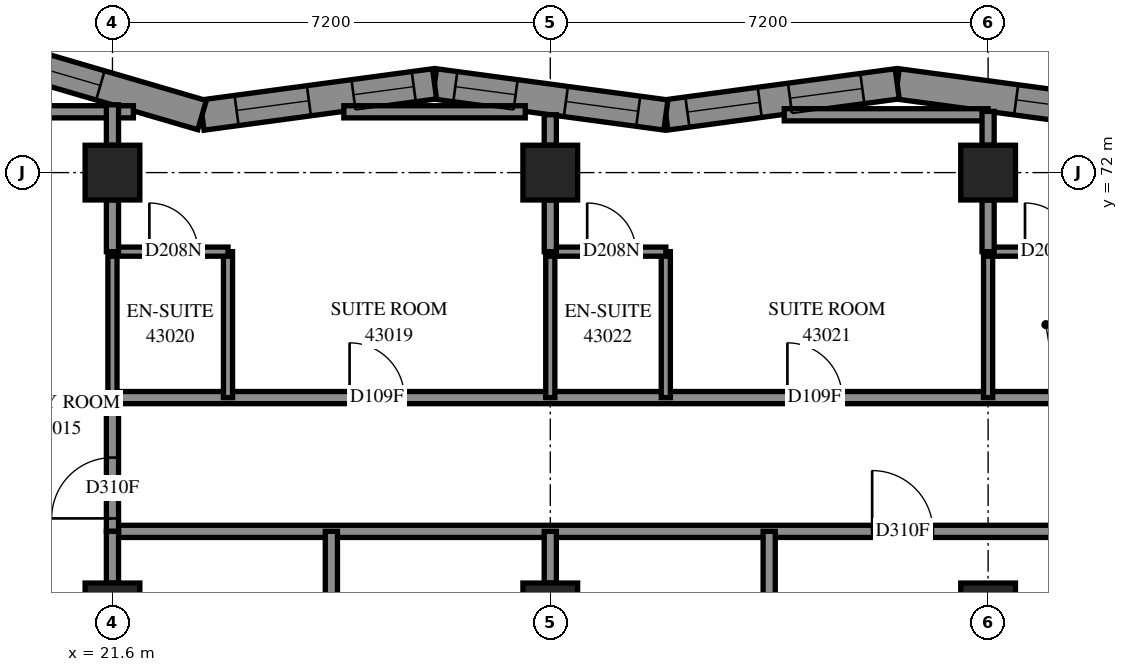
"""IFC4 building model, lengths in metres.
Left out: names, types, materials, properties, quantities, classifications, styles, units other than length and angle.
Written with IfcOpenShell. Run it as: python <this file> out.ifc"""

import sys

from ifc_helpers import new_model, si_unit, direction, frame, frame_2d, origin, origin_2d, place, context, subcontext, project, spatial, polyline, rectangle, outline, extrude, element, fill, save


model = new_model("IFC4")
c1 = context("Model", 3, precision=1e-05, world=origin(), true_north=direction((0.0, 1.0)))
c2 = subcontext(c1, "Body", "Model", "MODEL_VIEW")
j1 = project(units=[si_unit("LENGTHUNIT", "METRE"), si_unit("PLANEANGLEUNIT", "RADIAN")], contexts=[c1])
p1 = place(None, origin())
s1 = spatial("IfcSite", under=j1, at=p1, CompositionType="ELEMENT")
p2 = place(p1, origin())
s2 = spatial("IfcBuilding", under=s1, at=p2, CompositionType="ELEMENT")
p3 = place(p2, frame((0.0, 0.0, 159.2)))
s3 = spatial("IfcBuildingStorey", under=s2, at=p3, CompositionType="ELEMENT", Elevation=159.2)
for number, where, z_axis, x_axis in (
    (1, (21.6, 64.8, 0.0), (0.0, 0.0, 1.0), (1.0, 0.0, 0.0)),
    (2, (21.6, 72.0, 0.0), (0.0, 0.0, 1.0), (1.0, 0.0, 0.0)),
    (3, (28.8, 64.8, 0.0), (0.0, 0.0, 1.0), (1.0, 0.0, 0.0)),
    (4, (28.8, 72.0, 0.0), (0.0, 0.0, 1.0), (1.0, 0.0, 0.0)),
    (5, (36.0, 64.8, 0.0), (0.0, 0.0, 1.0), (1.0, 0.0, 0.0)),
    (6, (36.0, 72.0, 0.0), (0.0, 0.0, 1.0), (1.0, 0.0, 0.0)),
):
    element("IfcColumn", number, at=place(p3, frame(where, z_axis=z_axis, x_axis=x_axis)), inside=s3, PredefinedType="COLUMN", context=c2, shape_type="SweptSolid", body=[
        extrude(rectangle(XDim=0.9, YDim=0.9, at=origin_2d()), origin(), (0.0, 0.0, 1.0), 3.1),
    ])
p4 = place(p3, frame((38.31, 72.948, 0.0), z_axis=(0.0, 0.0, 1.0), x_axis=(-0.9910651652, 0.1333785524, 0.0)))
e7 = element("IfcWall", 7, at=p4, inside=s3, PredefinedType="SOLIDWALL", context=c2, shape_type="SweptSolid", body=[
    extrude(outline(polyline([(0.034, -0.25), (3.872, -0.25), (3.805, 0.25), (-0.034, 0.25), (0.034, -0.25)])), origin(), (0.0, 0.0, 1.0), 3.1),
])
p5 = place(p4, frame((0.665, 0.0, 0.45)))
e8 = element("IfcOpeningElement", 8, at=p5, cuts=e7, PredefinedType="OPENING", context=c2, shape_type="SweptSolid", body=[
    extrude(rectangle(XDim=1.2, YDim=2.5, at=frame_2d((0.6, 1.25))), frame((0.0, 0.26, 0.0), z_axis=(0.0, -1.0, 0.0), x_axis=(1.0, 0.0, 0.0)), (0.0, 0.0, 1.0), 0.52),
])
p6 = place(p3, frame((34.505, 73.46, 0.0), z_axis=(0.0, 0.0, 1.0), x_axis=(-0.9910647018, -0.133381996, 0.0)))
e9 = element("IfcWall", 9, at=p6, inside=s3, PredefinedType="SOLIDWALL", context=c2, shape_type="SweptSolid", body=[
    extrude(outline(polyline([(-0.034, -0.25), (3.805, -0.25), (3.872, 0.25), (0.034, 0.25), (-0.034, -0.25)])), origin(), (0.0, 0.0, 1.0), 3.1),
])
p7 = place(p6, frame((0.579, 0.0, 0.45)))
e10 = element("IfcOpeningElement", 10, at=p7, cuts=e9, PredefinedType="OPENING", context=c2, shape_type="SweptSolid", body=[
    extrude(rectangle(XDim=1.2, YDim=2.5, at=frame_2d((0.6, 1.25))), frame((0.0, 0.26, 0.0), z_axis=(0.0, -1.0, 0.0), x_axis=(1.0, 0.0, 0.0)), (0.0, 0.0, 1.0), 0.52),
])
p8 = place(p6, frame((2.281, 0.0, 0.45)))
e11 = element("IfcOpeningElement", 11, at=p8, cuts=e9, PredefinedType="OPENING", context=c2, shape_type="SweptSolid", body=[
    extrude(rectangle(XDim=1.2, YDim=2.5, at=frame_2d((0.6, 1.25))), frame((0.0, 0.26, 0.0), z_axis=(0.0, -1.0, 0.0), x_axis=(1.0, 0.0, 0.0)), (0.0, 0.0, 1.0), 0.52),
])
p9 = place(p3, frame((30.701, 72.948, 0.0), z_axis=(0.0, 0.0, 1.0), x_axis=(-0.9910651652, 0.1333785524, 0.0)))
e12 = element("IfcWall", 12, at=p9, inside=s3, PredefinedType="SOLIDWALL", context=c2, shape_type="SweptSolid", body=[
    extrude(outline(polyline([(0.034, -0.25), (3.872, -0.25), (3.805, 0.25), (-0.034, 0.25), (0.034, -0.25)])), origin(), (0.0, 0.0, 1.0), 3.1),
])
p10 = place(p9, frame((0.459, 0.0, 0.45)))
e13 = element("IfcOpeningElement", 13, at=p10, cuts=e12, PredefinedType="OPENING", context=c2, shape_type="SweptSolid", body=[
    extrude(rectangle(XDim=1.2, YDim=2.5, at=frame_2d((0.6, 1.25))), frame((0.0, 0.26, 0.0), z_axis=(0.0, -1.0, 0.0), x_axis=(1.0, 0.0, 0.0)), (0.0, 0.0, 1.0), 0.52),
])
p11 = place(p9, frame((2.494, 0.0, 0.45)))
e14 = element("IfcOpeningElement", 14, at=p11, cuts=e12, PredefinedType="OPENING", context=c2, shape_type="SweptSolid", body=[
    extrude(rectangle(XDim=1.0, YDim=2.5, at=frame_2d((0.5, 1.25))), frame((0.0, 0.26, 0.0), z_axis=(0.0, -1.0, 0.0), x_axis=(1.0, 0.0, 0.0)), (0.0, 0.0, 1.0), 0.52),
])
p12 = place(p3, frame((26.897, 73.46, 0.0), z_axis=(0.0, 0.0, 1.0), x_axis=(-0.9910680415, -0.1333571784, 0.0)))
e15 = element("IfcWall", 15, at=p12, inside=s3, PredefinedType="SOLIDWALL", context=c2, shape_type="SweptSolid", body=[
    extrude(outline(polyline([(-0.034, -0.25), (3.805, -0.25), (3.911, 0.25), (0.034, 0.25), (-0.034, -0.25)])), origin(), (0.0, 0.0, 1.0), 3.1),
])
p13 = place(p12, frame((2.085, 0.0, 0.45)))
e16 = element("IfcOpeningElement", 16, at=p13, cuts=e15, PredefinedType="OPENING", context=c2, shape_type="SweptSolid", body=[
    extrude(rectangle(XDim=1.2, YDim=2.5, at=frame_2d((0.6, 1.25))), frame((0.0, 0.26, 0.0), z_axis=(0.0, -1.0, 0.0), x_axis=(1.0, 0.0, 0.0)), (0.0, 0.0, 1.0), 0.52),
])
p14 = place(p12, frame((0.345, 0.0, 0.45)))
e17 = element("IfcOpeningElement", 17, at=p14, cuts=e15, PredefinedType="OPENING", context=c2, shape_type="SweptSolid", body=[
    extrude(rectangle(XDim=1.0, YDim=2.5, at=frame_2d((0.5, 1.25))), frame((0.0, 0.26, 0.0), z_axis=(0.0, -1.0, 0.0), x_axis=(1.0, 0.0, 0.0)), (0.0, 0.0, 1.0), 0.52),
])
p15 = place(p3, frame((23.073, 72.945, 0.0), z_axis=(0.0, 0.0, 1.0), x_axis=(-0.9598371454, 0.2805577557, 0.0)))
e18 = element("IfcWall", 18, at=p15, inside=s3, PredefinedType="SOLIDWALL", context=c2, shape_type="SweptSolid", body=[
    extrude(outline(polyline([(0.053, -0.25), (4.017, -0.25), (3.349, 0.25), (-0.053, 0.25), (0.053, -0.25)])), origin(), (0.0, 0.0, 1.0), 3.1),
])
p16 = place(p15, frame((1.742, 0.0, 0.45)))
e19 = element("IfcOpeningElement", 19, at=p16, cuts=e18, PredefinedType="OPENING", context=c2, shape_type="SweptSolid", body=[
    extrude(rectangle(XDim=1.2, YDim=2.5, at=frame_2d((0.6, 1.25))), frame((0.0, 0.26, 0.0), z_axis=(0.0, -1.0, 0.0), x_axis=(1.0, 0.0, 0.0)), (0.0, 0.0, 1.0), 0.52),
])
p17 = place(p3, frame((21.6, 68.3, 0.0), z_axis=(0.0, 0.0, 1.0), x_axis=(1.0, 0.0, 0.0)))
e20 = element("IfcWall", 20, at=p17, inside=s3, PredefinedType="PARTITIONING", context=c2, shape_type="SweptSolid", body=[
    extrude(rectangle(XDim=19.1, YDim=0.2, at=frame_2d((9.55, 0.0))), origin(), (0.0, 0.0, 1.0), 3.1),
])
p18 = place(p17, frame((3.899, 0.0, 0.0)))
e21 = element("IfcOpeningElement", 21, at=p18, cuts=e20, PredefinedType="OPENING", context=c2, shape_type="SweptSolid", body=[
    extrude(rectangle(XDim=0.9, YDim=2.1, at=frame_2d((0.45, 1.05))), frame((0.0, 0.11, 0.0), z_axis=(0.0, -1.0, 0.0), x_axis=(1.0, 0.0, 0.0)), (0.0, 0.0, 1.0), 0.22),
])
p19 = place(p17, frame((11.099, 0.0, 0.0)))
e22 = element("IfcOpeningElement", 22, at=p19, cuts=e20, PredefinedType="OPENING", context=c2, shape_type="SweptSolid", body=[
    extrude(rectangle(XDim=0.9, YDim=2.1, at=frame_2d((0.45, 1.05))), frame((0.0, 0.11, 0.0), z_axis=(0.0, -1.0, 0.0), x_axis=(1.0, 0.0, 0.0)), (0.0, 0.0, 1.0), 0.22),
])
p20 = place(p17, frame((16.7, 0.0, 0.0)))
e23 = element("IfcOpeningElement", 23, at=p20, cuts=e20, PredefinedType="OPENING", context=c2, shape_type="SweptSolid", body=[
    extrude(rectangle(XDim=0.9, YDim=2.1, at=frame_2d((0.45, 1.05))), frame((0.0, 0.11, 0.0), z_axis=(0.0, -1.0, 0.0), x_axis=(1.0, 0.0, 0.0)), (0.0, 0.0, 1.0), 0.22),
])
p21 = place(p3, frame((21.6, 66.1, 0.0), z_axis=(0.0, 0.0, 1.0), x_axis=(1.0, 0.0, 0.0)))
e24 = element("IfcWall", 24, at=p21, inside=s3, PredefinedType="PARTITIONING", context=c2, shape_type="SweptSolid", body=[
    extrude(rectangle(XDim=16.9, YDim=0.2, at=frame_2d((8.45, 0.0))), origin(), (0.0, 0.0, 1.0), 3.1),
])
p22 = place(p21, frame((12.493, 0.0, 0.0)))
e25 = element("IfcOpeningElement", 25, at=p22, cuts=e24, PredefinedType="OPENING", context=c2, shape_type="SweptSolid", body=[
    extrude(rectangle(XDim=1.0, YDim=2.1, at=frame_2d((0.5, 1.05))), frame((0.0, 0.11, 0.0), z_axis=(0.0, -1.0, 0.0), x_axis=(1.0, 0.0, 0.0)), (0.0, 0.0, 1.0), 0.22),
])
for number, where, z_axis, x_axis in (
    (26, (25.2, 62.988, 0.0), (0.0, 0.0, 1.0), (0.0, 1.0, 0.0)),
    (27, (32.4, 62.988, 0.0), (0.0, 0.0, 1.0), (0.0, 1.0, 0.0)),
):
    element("IfcWall", number, at=place(p3, frame(where, z_axis=z_axis, x_axis=x_axis)), inside=s3, PredefinedType="PARTITIONING", context=c2, shape_type="SweptSolid", body=[
        extrude(rectangle(XDim=3.112, YDim=0.2, at=frame_2d((1.556, 0.0))), origin(), (0.0, 0.0, 1.0), 3.1),
    ])
p23 = place(p3, frame((25.405, 73.0, 0.0), z_axis=(0.0, 0.0, 1.0), x_axis=(1.0, 0.0, 0.0)))
e28 = element("IfcWall", 28, at=p23, inside=s3, PredefinedType="PARTITIONING", context=c2, shape_type="SweptSolid", body=[
    extrude(rectangle(XDim=2.983, YDim=0.2, at=frame_2d((1.492, 0.0))), origin(), (0.0, 0.0, 1.0), 3.1),
])
p24 = place(p3, frame((32.648, 72.951, 0.0), z_axis=(0.0, 0.0, 1.0), x_axis=(1.0, 0.0, 0.0)))
e29 = element("IfcWall", 29, at=p24, inside=s3, PredefinedType="PARTITIONING", context=c2, shape_type="SweptSolid", body=[
    extrude(rectangle(XDim=3.352, YDim=0.2, at=frame_2d((1.676, 0.0))), origin(), (0.0, 0.0, 1.0), 3.1),
])
p25 = place(p3, frame((21.6, 68.3, 0.0), z_axis=(0.0, 0.0, 1.0), x_axis=(0.0, 1.0, 0.0)))
e30 = element("IfcWall", 30, at=p25, inside=s3, PredefinedType="PARTITIONING", context=c2, shape_type="SweptSolid", body=[
    extrude(rectangle(XDim=2.4, YDim=0.15, at=frame_2d((1.2, 0.0))), origin(), (0.0, 0.0, 1.0), 2.6),
])
for number, where, z_axis, x_axis in (
    (31, (23.5, 68.3, 0.0), (0.0, 0.0, 1.0), (0.0, 1.0, 0.0)),
    (32, (28.8, 68.3, 0.0), (0.0, 0.0, 1.0), (0.0, 1.0, 0.0)),
    (33, (30.7, 68.3, 0.0), (0.0, 0.0, 1.0), (0.0, 1.0, 0.0)),
    (34, (36.0, 68.3, 0.0), (0.0, 0.0, 1.0), (0.0, 1.0, 0.0)),
):
    element("IfcWall", number, at=place(p3, frame(where, z_axis=z_axis, x_axis=x_axis)), inside=s3, PredefinedType="PARTITIONING", context=c2, shape_type="SweptSolid", body=[
        extrude(rectangle(XDim=2.4, YDim=0.15, at=frame_2d((1.2, 0.0))), origin(), (0.0, 0.0, 1.0), 3.1),
    ])
p26 = place(p3, frame((21.6, 66.1, 0.0), z_axis=(0.0, 0.0, 1.0), x_axis=(0.0, 1.0, 0.0)))
e35 = element("IfcWall", 35, at=p26, inside=s3, PredefinedType="PARTITIONING", context=c2, shape_type="SweptSolid", body=[
    extrude(rectangle(XDim=2.2, YDim=0.2, at=frame_2d((1.1, 0.0))), origin(), (0.0, 0.0, 1.0), 2.6),
])
p27 = place(p26, frame((0.213, 0.0, 0.0)))
e36 = element("IfcOpeningElement", 36, at=p27, cuts=e35, PredefinedType="OPENING", context=c2, shape_type="SweptSolid", body=[
    extrude(rectangle(XDim=1.0, YDim=2.1, at=frame_2d((0.5, 1.05))), frame((0.0, 0.11, 0.0), z_axis=(0.0, -1.0, 0.0), x_axis=(1.0, 0.0, 0.0)), (0.0, 0.0, 1.0), 0.22),
])
p28 = place(p3, frame((19.788, 73.0, 0.0), z_axis=(0.0, 0.0, 1.0), x_axis=(1.0, 0.0, 0.0)))
e37 = element("IfcWall", 37, at=p28, inside=s3, PredefinedType="PARTITIONING", context=c2, shape_type="SweptSolid", body=[
    extrude(rectangle(XDim=2.156, YDim=0.2, at=frame_2d((1.078, 0.0))), origin(), (0.0, 0.0, 1.0), 3.1),
])
p29 = place(p3, frame((21.6, 70.7, 0.0), z_axis=(0.0, 0.0, 1.0), x_axis=(1.0, 0.0, 0.0)))
e38 = element("IfcWall", 38, at=p29, inside=s3, PredefinedType="PARTITIONING", context=c2, shape_type="SweptSolid", body=[
    extrude(rectangle(XDim=1.9, YDim=0.15, at=frame_2d((0.95, 0.0))), origin(), (0.0, 0.0, 1.0), 3.1),
])
p30 = place(p29, frame((0.607, 0.0, 0.0)))
e39 = element("IfcOpeningElement", 39, at=p30, cuts=e38, PredefinedType="OPENING", context=c2, shape_type="SweptSolid", body=[
    extrude(rectangle(XDim=0.8, YDim=2.1, at=frame_2d((0.4, 1.05))), frame((0.0, 0.085, 0.0), z_axis=(0.0, -1.0, 0.0), x_axis=(1.0, 0.0, 0.0)), (0.0, 0.0, 1.0), 0.17),
])
p31 = place(p3, frame((28.8, 70.7, 0.0), z_axis=(0.0, 0.0, 1.0), x_axis=(1.0, 0.0, 0.0)))
e40 = element("IfcWall", 40, at=p31, inside=s3, PredefinedType="PARTITIONING", context=c2, shape_type="SweptSolid", body=[
    extrude(rectangle(XDim=1.9, YDim=0.15, at=frame_2d((0.95, 0.0))), origin(), (0.0, 0.0, 1.0), 3.1),
])
p32 = place(p31, frame((0.607, 0.0, 0.0)))
e41 = element("IfcOpeningElement", 41, at=p32, cuts=e40, PredefinedType="OPENING", context=c2, shape_type="SweptSolid", body=[
    extrude(rectangle(XDim=0.8, YDim=2.1, at=frame_2d((0.4, 1.05))), frame((0.0, 0.085, 0.0), z_axis=(0.0, -1.0, 0.0), x_axis=(1.0, 0.0, 0.0)), (0.0, 0.0, 1.0), 0.17),
])
p33 = place(p3, frame((36.0, 70.7, 0.0), z_axis=(0.0, 0.0, 1.0), x_axis=(1.0, 0.0, 0.0)))
e42 = element("IfcWall", 42, at=p33, inside=s3, PredefinedType="PARTITIONING", context=c2, shape_type="SweptSolid", body=[
    extrude(rectangle(XDim=1.9, YDim=0.15, at=frame_2d((0.95, 0.0))), origin(), (0.0, 0.0, 1.0), 3.1),
])
p34 = place(p33, frame((0.607, 0.0, 0.0)))
e43 = element("IfcOpeningElement", 43, at=p34, cuts=e42, PredefinedType="OPENING", context=c2, shape_type="SweptSolid", body=[
    extrude(rectangle(XDim=0.8, YDim=2.1, at=frame_2d((0.4, 1.05))), frame((0.0, 0.085, 0.0), z_axis=(0.0, -1.0, 0.0), x_axis=(1.0, 0.0, 0.0)), (0.0, 0.0, 1.0), 0.17),
])
for number, where, z_axis, x_axis in (
    (44, (21.6, 65.25, 0.0), (0.0, 0.0, 1.0), (0.0, 1.0, 0.0)),
    (45, (21.6, 70.7, 0.0), (0.0, 0.0, 1.0), (0.0, 1.0, 0.0)),
):
    element("IfcWall", number, at=place(p3, frame(where, z_axis=z_axis, x_axis=x_axis)), inside=s3, PredefinedType="PARTITIONING", context=c2, shape_type="SweptSolid", body=[
        extrude(rectangle(XDim=0.85, YDim=0.2, at=frame_2d((0.425, 0.0))), origin(), (0.0, 0.0, 1.0), 2.6),
    ])
for number, where, z_axis, x_axis in (
    (46, (28.8, 65.25, 0.0), (0.0, 0.0, 1.0), (0.0, 1.0, 0.0)),
    (47, (28.8, 70.7, 0.0), (0.0, 0.0, 1.0), (0.0, 1.0, 0.0)),
    (48, (36.0, 70.7, 0.0), (0.0, 0.0, 1.0), (0.0, 1.0, 0.0)),
):
    element("IfcWall", number, at=place(p3, frame(where, z_axis=z_axis, x_axis=x_axis)), inside=s3, PredefinedType="PARTITIONING", context=c2, shape_type="SweptSolid", body=[
        extrude(rectangle(XDim=0.85, YDim=0.2, at=frame_2d((0.425, 0.0))), origin(), (0.0, 0.0, 1.0), 3.1),
    ])
p35 = place(p3, frame((21.6, 72.45, 0.0), z_axis=(0.0, 0.0, 1.0), x_axis=(0.0, 1.0, 0.0)))
e49 = element("IfcWall", 49, at=p35, inside=s3, PredefinedType="PARTITIONING", context=c2, shape_type="SweptSolid", body=[
    extrude(rectangle(XDim=0.665, YDim=0.2, at=frame_2d((0.333, 0.0))), origin(), (0.0, 0.0, 1.0), 3.1),
])
p36 = place(p3, frame((36.0, 72.45, 0.0), z_axis=(0.0, 0.0, 1.0), x_axis=(0.0, 1.0, 0.0)))
e50 = element("IfcWall", 50, at=p36, inside=s3, PredefinedType="PARTITIONING", context=c2, shape_type="SweptSolid", body=[
    extrude(rectangle(XDim=0.556, YDim=0.2, at=frame_2d((0.278, 0.0))), origin(), (0.0, 0.0, 1.0), 3.1),
])
p37 = place(p3, frame((28.8, 72.45, 0.0), z_axis=(0.0, 0.0, 1.0), x_axis=(0.0, 1.0, 0.0)))
e51 = element("IfcWall", 51, at=p37, inside=s3, PredefinedType="PARTITIONING", context=c2, shape_type="SweptSolid", body=[
    extrude(rectangle(XDim=0.501, YDim=0.2, at=frame_2d((0.251, 0.0))), origin(), (0.0, 0.0, 1.0), 3.1),
])
p38 = place(p5, origin())
e52 = element("IfcWindow", 52, at=p38, inside=s3, PartitioningType="SINGLE_PANEL", PredefinedType="WINDOW", context=c2, shape_type="SweptSolid", body=[
    extrude(rectangle(XDim=1.2, YDim=2.5, at=frame_2d((0.6, 1.25))), frame((0.0, 0.18, 0.0), z_axis=(0.0, -1.0, 0.0), x_axis=(1.0, 0.0, 0.0)), (0.0, 0.0, 1.0), 0.06),
])
fill(e8, e52)
p39 = place(p7, origin())
e53 = element("IfcWindow", 53, at=p39, inside=s3, PartitioningType="SINGLE_PANEL", PredefinedType="WINDOW", context=c2, shape_type="SweptSolid", body=[
    extrude(rectangle(XDim=1.2, YDim=2.5, at=frame_2d((0.6, 1.25))), frame((0.0, 0.12, 0.0), z_axis=(0.0, -1.0, 0.0), x_axis=(1.0, 0.0, 0.0)), (0.0, 0.0, 1.0), 0.06),
])
fill(e10, e53)
p40 = place(p8, origin())
e54 = element("IfcWindow", 54, at=p40, inside=s3, PartitioningType="SINGLE_PANEL", PredefinedType="WINDOW", context=c2, shape_type="SweptSolid", body=[
    extrude(rectangle(XDim=1.2, YDim=2.5, at=frame_2d((0.6, 1.25))), frame((0.0, 0.18, 0.0), z_axis=(0.0, -1.0, 0.0), x_axis=(1.0, 0.0, 0.0)), (0.0, 0.0, 1.0), 0.06),
])
fill(e11, e54)
p41 = place(p10, origin())
e55 = element("IfcWindow", 55, at=p41, inside=s3, PartitioningType="SINGLE_PANEL", PredefinedType="WINDOW", context=c2, shape_type="SweptSolid", body=[
    extrude(rectangle(XDim=1.2, YDim=2.5, at=frame_2d((0.6, 1.25))), frame((0.0, 0.18, 0.0), z_axis=(0.0, -1.0, 0.0), x_axis=(1.0, 0.0, 0.0)), (0.0, 0.0, 1.0), 0.06),
])
fill(e13, e55)
p42 = place(p13, origin())
e56 = element("IfcWindow", 56, at=p42, inside=s3, PartitioningType="SINGLE_PANEL", PredefinedType="WINDOW", context=c2, shape_type="SweptSolid", body=[
    extrude(rectangle(XDim=1.2, YDim=2.5, at=frame_2d((0.6, 1.25))), frame((0.0, 0.18, 0.0), z_axis=(0.0, -1.0, 0.0), x_axis=(1.0, 0.0, 0.0)), (0.0, 0.0, 1.0), 0.06),
])
fill(e16, e56)
p43 = place(p16, origin())
e57 = element("IfcWindow", 57, at=p43, inside=s3, PartitioningType="SINGLE_PANEL", PredefinedType="WINDOW", context=c2, shape_type="SweptSolid", body=[
    extrude(rectangle(XDim=1.2, YDim=2.5, at=frame_2d((0.6, 1.25))), frame((0.0, 0.18, 0.0), z_axis=(0.0, -1.0, 0.0), x_axis=(1.0, 0.0, 0.0)), (0.0, 0.0, 1.0), 0.06),
])
fill(e19, e57)
p44 = place(p27, origin())
e58 = element("IfcDoor", 58, at=p44, inside=s3, OperationType="SINGLE_SWING_LEFT", PredefinedType="DOOR", context=c2, shape_type="SweptSolid", body=[
    extrude(rectangle(XDim=1.0, YDim=2.1, at=frame_2d((0.5, 1.05))), frame((0.0, 0.025, 0.0), z_axis=(0.0, -1.0, 0.0), x_axis=(1.0, 0.0, 0.0)), (0.0, 0.0, 1.0), 0.05),
])
fill(e36, e58)
p45 = place(p18, origin())
e59 = element("IfcDoor", 59, at=p45, inside=s3, OperationType="SINGLE_SWING_RIGHT", PredefinedType="DOOR", context=c2, shape_type="SweptSolid", body=[
    extrude(rectangle(XDim=0.9, YDim=2.1, at=frame_2d((0.45, 1.05))), frame((0.0, 0.025, 0.0), z_axis=(0.0, -1.0, 0.0), x_axis=(1.0, 0.0, 0.0)), (0.0, 0.0, 1.0), 0.05),
])
fill(e21, e59)
p46 = place(p30, origin())
e60 = element("IfcDoor", 60, at=p46, inside=s3, OperationType="SINGLE_SWING_RIGHT", PredefinedType="DOOR", context=c2, shape_type="SweptSolid", body=[
    extrude(rectangle(XDim=0.8, YDim=2.1, at=frame_2d((0.4, 1.05))), frame((0.0, 0.025, 0.0), z_axis=(0.0, -1.0, 0.0), x_axis=(1.0, 0.0, 0.0)), (0.0, 0.0, 1.0), 0.05),
])
fill(e39, e60)
p47 = place(p19, origin())
e61 = element("IfcDoor", 61, at=p47, inside=s3, OperationType="SINGLE_SWING_RIGHT", PredefinedType="DOOR", context=c2, shape_type="SweptSolid", body=[
    extrude(rectangle(XDim=0.9, YDim=2.1, at=frame_2d((0.45, 1.05))), frame((0.0, 0.025, 0.0), z_axis=(0.0, -1.0, 0.0), x_axis=(1.0, 0.0, 0.0)), (0.0, 0.0, 1.0), 0.05),
])
fill(e22, e61)
p48 = place(p32, origin())
e62 = element("IfcDoor", 62, at=p48, inside=s3, OperationType="SINGLE_SWING_RIGHT", PredefinedType="DOOR", context=c2, shape_type="SweptSolid", body=[
    extrude(rectangle(XDim=0.8, YDim=2.1, at=frame_2d((0.4, 1.05))), frame((0.0, 0.025, 0.0), z_axis=(0.0, -1.0, 0.0), x_axis=(1.0, 0.0, 0.0)), (0.0, 0.0, 1.0), 0.05),
])
fill(e41, e62)
p49 = place(p34, origin())
e63 = element("IfcDoor", 63, at=p49, inside=s3, OperationType="SINGLE_SWING_RIGHT", PredefinedType="DOOR", context=c2, shape_type="SweptSolid", body=[
    extrude(rectangle(XDim=0.8, YDim=2.1, at=frame_2d((0.4, 1.05))), frame((0.0, 0.025, 0.0), z_axis=(0.0, -1.0, 0.0), x_axis=(1.0, 0.0, 0.0)), (0.0, 0.0, 1.0), 0.05),
])
fill(e43, e63)
p50 = place(p22, origin())
e64 = element("IfcDoor", 64, at=p50, inside=s3, OperationType="SINGLE_SWING_RIGHT", PredefinedType="DOOR", context=c2, shape_type="SweptSolid", body=[
    extrude(rectangle(XDim=1.0, YDim=2.1, at=frame_2d((0.5, 1.05))), frame((0.0, 0.025, 0.0), z_axis=(0.0, -1.0, 0.0), x_axis=(1.0, 0.0, 0.0)), (0.0, 0.0, 1.0), 0.05),
])
fill(e25, e64)
p51 = place(p11, origin())
e65 = element("IfcWindow", 65, at=p51, inside=s3, PartitioningType="SINGLE_PANEL", PredefinedType="WINDOW", context=c2, shape_type="SweptSolid", body=[
    extrude(rectangle(XDim=1.0, YDim=2.5, at=frame_2d((0.5, 1.25))), frame((0.0, 0.12, 0.0), z_axis=(0.0, -1.0, 0.0), x_axis=(1.0, 0.0, 0.0)), (0.0, 0.0, 1.0), 0.06),
])
fill(e14, e65)
p52 = place(p14, origin())
e66 = element("IfcWindow", 66, at=p52, inside=s3, PartitioningType="SINGLE_PANEL", PredefinedType="WINDOW", context=c2, shape_type="SweptSolid", body=[
    extrude(rectangle(XDim=1.0, YDim=2.5, at=frame_2d((0.5, 1.25))), frame((0.0, 0.12, 0.0), z_axis=(0.0, -1.0, 0.0), x_axis=(1.0, 0.0, 0.0)), (0.0, 0.0, 1.0), 0.06),
])
fill(e17, e66)
save(model, sys.argv[1])
